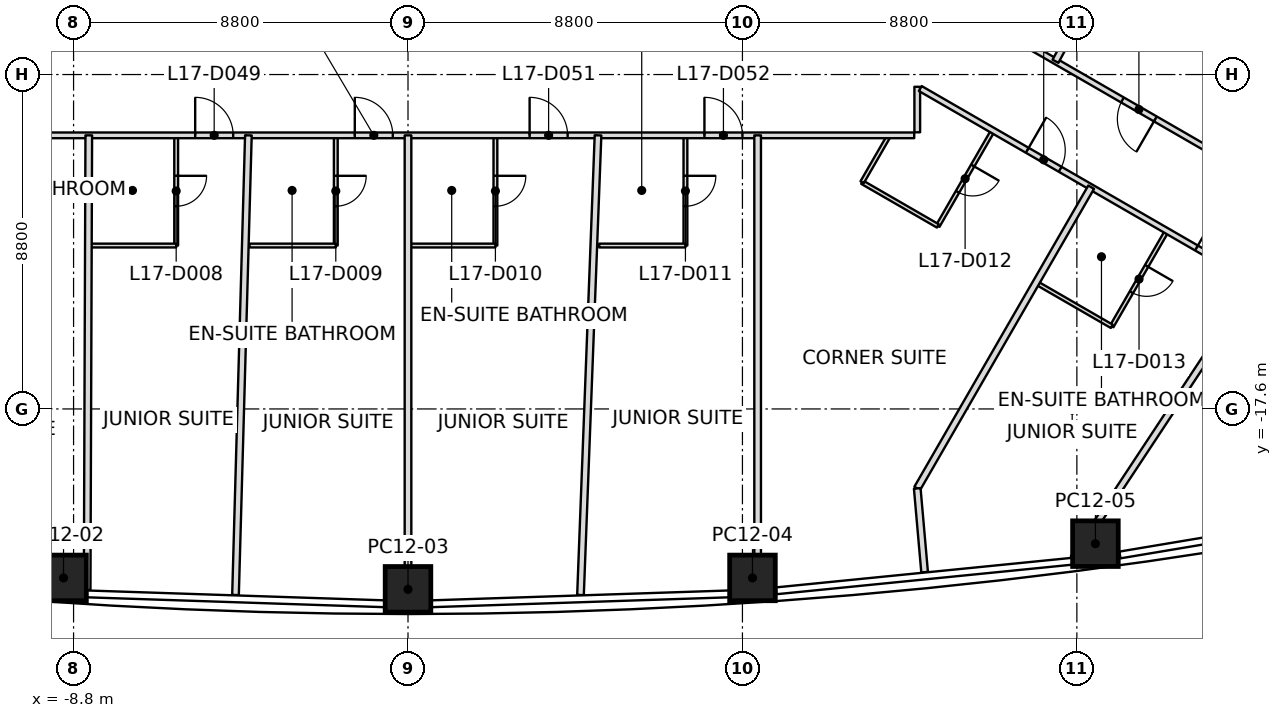
"""IFC4 building model, lengths in metres.
Left out: names, types, materials, properties, quantities, classifications, styles, units other than length and angle.
Written with IfcOpenShell. Run it as: python <this file> out.ifc"""

import sys

from ifc_helpers import new_model, si_unit, direction, frame, frame_2d, origin, origin_2d, place, context, subcontext, project, spatial, rectangle, extrude, element, fill, save


model = new_model("IFC4")
c1 = context("Model", 3, precision=1e-05, world=origin(), true_north=direction((0.0, 1.0)))
c2 = subcontext(c1, "Body", "Model", "MODEL_VIEW")
j1 = project(units=[si_unit("LENGTHUNIT", "METRE"), si_unit("PLANEANGLEUNIT", "RADIAN")], contexts=[c1])
p1 = place(None, origin())
s1 = spatial("IfcSite", under=j1, at=p1, CompositionType="ELEMENT")
p2 = place(p1, origin())
s2 = spatial("IfcBuilding", under=s1, at=p2, CompositionType="ELEMENT")
p3 = place(p2, frame((0.0, 0.0, 85.0)))
s3 = spatial("IfcBuildingStorey", under=s2, at=p3, CompositionType="ELEMENT", Elevation=85.0)
p4 = place(p3, frame((-9.064, -22.046, 0.0), z_axis=(0.00963262733, 0.012139749512, 0.999879912276), x_axis=(-0.99775239864, 0.06642749461, 0.008805621326)))
e1 = element("IfcColumn", 1, at=p4, inside=s3, PredefinedType="COLUMN", context=c2, shape_type="SweptSolid", body=[
    extrude(rectangle(XDim=1.2, YDim=1.2, at=origin_2d()), origin(), (0.0, 0.0, 1.0), 3.7),
])
p5 = place(p3, frame((0.0, -22.347, 0.0), z_axis=(0.0, 0.012338222751, 0.999923881233), x_axis=(1.0, 0.0, 0.0)))
e2 = element("IfcColumn", 2, at=p5, inside=s3, PredefinedType="COLUMN", context=c2, shape_type="SweptSolid", body=[
    extrude(rectangle(XDim=1.2, YDim=1.2, at=origin_2d()), origin(), (0.0, 0.0, 1.0), 3.7),
])
p6 = place(p3, frame((9.064, -22.046, 0.0), z_axis=(-0.00963262733, 0.012139749512, 0.999879912276), x_axis=(0.99775239864, 0.06642749461, 0.008805621326)))
e3 = element("IfcColumn", 3, at=p6, inside=s3, PredefinedType="COLUMN", context=c2, shape_type="SweptSolid", body=[
    extrude(rectangle(XDim=1.2, YDim=1.2, at=origin_2d()), origin(), (0.0, 0.0, 1.0), 3.7),
])
p7 = place(p3, frame((18.088, -21.145, 0.0), z_axis=(-0.019196808933, 0.011346567479, 0.99975133805), x_axis=(0.991022032909, 0.132545119301, 0.017524886246)))
e4 = element("IfcColumn", 4, at=p7, inside=s3, PredefinedType="COLUMN", context=c2, shape_type="SweptSolid", body=[
    extrude(rectangle(XDim=1.2, YDim=1.2, at=origin_2d()), origin(), (0.0, 0.0, 1.0), 3.701),
])
p8 = place(p3, frame((-8.4, -10.4, 0.0), z_axis=(0.0, 0.0, 1.0), x_axis=(-0.003610968563, -0.999993480432, 0.0)))
e5 = element("IfcWall", 5, at=p8, inside=s3, PredefinedType="PARTITIONING", context=c2, shape_type="SweptSolid", body=[
    extrude(rectangle(XDim=11.967, YDim=0.175, at=frame_2d((5.983, 0.0))), origin(), (0.0, 0.0, 1.0), 2.784),
])
p9 = place(p3, frame((-4.2, -10.4, 0.0), z_axis=(0.0, 0.0, 1.0), x_axis=(-0.028002254574, -0.999607859982, 0.0)))
e6 = element("IfcWall", 6, at=p9, inside=s3, PredefinedType="PARTITIONING", context=c2, shape_type="SweptSolid", body=[
    extrude(rectangle(XDim=12.101, YDim=0.175, at=frame_2d((6.051, 0.0))), origin(), (0.0, 0.0, 1.0), 2.784),
])
p10 = place(p3, frame((0.0, -10.4, 0.0), z_axis=(0.0, 0.0, 1.0), x_axis=(0.0, -1.0, 0.0)))
e7 = element("IfcWall", 7, at=p10, inside=s3, PredefinedType="PARTITIONING", context=c2, shape_type="SweptSolid", body=[
    extrude(rectangle(XDim=12.477, YDim=0.175, at=frame_2d((6.239, 0.0))), origin(), (0.0, 0.0, 1.0), 3.0),
])
p11 = place(p3, frame((5.0, -10.4, 0.0), z_axis=(0.0, 0.0, 1.0), x_axis=(-0.038096970103, -0.999274046931, 0.0)))
e8 = element("IfcWall", 8, at=p11, inside=s3, PredefinedType="PARTITIONING", context=c2, shape_type="SweptSolid", body=[
    extrude(rectangle(XDim=12.105, YDim=0.175, at=frame_2d((6.053, 0.0))), origin(), (0.0, 0.0, 1.0), 2.784),
])
p12 = place(p3, frame((9.2, -10.4, 0.0), z_axis=(0.0, 0.0, 1.0), x_axis=(0.0, -1.0, 0.0)))
e9 = element("IfcWall", 9, at=p12, inside=s3, PredefinedType="PARTITIONING", context=c2, shape_type="SweptSolid", body=[
    extrude(rectangle(XDim=12.166, YDim=0.175, at=frame_2d((6.083, 0.0))), origin(), (0.0, 0.0, 1.0), 3.0),
])
p13 = place(p3, frame((17.976, -11.764, 0.0), z_axis=(0.0, 0.0, 1.0), x_axis=(-0.500014927562, -0.866016785181, 0.0)))
e10 = element("IfcWall", 10, at=p13, inside=s3, PredefinedType="PARTITIONING", context=c2, shape_type="SweptSolid", body=[
    extrude(rectangle(XDim=9.153, YDim=0.175, at=frame_2d((4.576, 0.0))), origin(), (0.0, 0.0, 1.0), 2.943),
])
p14 = place(p3, frame((13.4, -19.691, 0.0), z_axis=(0.0, 0.0, 1.0), x_axis=(0.087462475332, -0.996167814883, 0.0)))
e11 = element("IfcWall", 11, at=p14, inside=s3, PredefinedType="PARTITIONING", context=c2, shape_type="SweptSolid", body=[
    extrude(rectangle(XDim=2.214, YDim=0.175, at=frame_2d((1.107, 0.0))), origin(), (0.0, 0.0, 1.0), 2.784),
])
p15 = place(p3, frame((23.629, 3.835, 0.0), z_axis=(0.0, 0.0, 1.0), x_axis=(-0.472762655376, -0.881189804572, 0.0)))
e12 = element("IfcWall", 12, at=p15, inside=s3, PredefinedType="PARTITIONING", context=c2, shape_type="SweptSolid", body=[
    extrude(rectangle(XDim=13.942, YDim=0.175, at=frame_2d((6.971, 0.0))), origin(), (0.0, 0.0, 1.0), 2.947),
])
p16 = place(p3, frame((22.306, -14.264, 0.0), z_axis=(0.0, 0.0, 1.0), x_axis=(-0.5509763379, -0.834520865571, 0.0)))
e13 = element("IfcWall", 13, at=p16, inside=s3, PredefinedType="PARTITIONING", context=c2, shape_type="SweptSolid", body=[
    extrude(rectangle(XDim=8.697, YDim=0.175, at=frame_2d((4.349, 0.0))), origin(), (0.0, 0.0, 1.0), 3.0),
])
p17 = place(p3, frame((-13.32, -10.4, 0.0), z_axis=(0.0, 0.0, 1.0), x_axis=(1.0, 0.0, 0.0)))
e14 = element("IfcWall", 14, at=p17, inside=s3, PredefinedType="PARTITIONING", context=c2, shape_type="SweptSolid", body=[
    extrude(rectangle(XDim=26.64, YDim=0.15, at=frame_2d((13.32, 0.0))), origin(), (0.0, 0.0, 1.0), 2.797),
])
p18 = place(p17, frame((7.72, 0.0, 0.0)))
e15 = element("IfcOpeningElement", 15, at=p18, cuts=e14, PredefinedType="OPENING", context=c2, shape_type="SweptSolid", body=[
    extrude(rectangle(XDim=1.0, YDim=2.1, at=frame_2d((0.5, 1.05))), frame((0.0, 0.075, 0.0), z_axis=(0.0, -1.0, 0.0), x_axis=(1.0, 0.0, 0.0)), (0.0, 0.0, 1.0), 0.15),
])
p19 = place(p17, frame((11.92, 0.0, 0.0)))
e16 = element("IfcOpeningElement", 16, at=p19, cuts=e14, PredefinedType="OPENING", context=c2, shape_type="SweptSolid", body=[
    extrude(rectangle(XDim=1.0, YDim=2.1, at=frame_2d((0.5, 1.05))), frame((0.0, 0.075, 0.0), z_axis=(0.0, -1.0, 0.0), x_axis=(1.0, 0.0, 0.0)), (0.0, 0.0, 1.0), 0.15),
])
p20 = place(p17, frame((16.52, 0.0, 0.0)))
e17 = element("IfcOpeningElement", 17, at=p20, cuts=e14, PredefinedType="OPENING", context=c2, shape_type="SweptSolid", body=[
    extrude(rectangle(XDim=1.0, YDim=2.1, at=frame_2d((0.5, 1.05))), frame((0.0, 0.075, 0.0), z_axis=(0.0, -1.0, 0.0), x_axis=(1.0, 0.0, 0.0)), (0.0, 0.0, 1.0), 0.15),
])
p21 = place(p17, frame((21.12, 0.0, 0.0)))
e18 = element("IfcOpeningElement", 18, at=p21, cuts=e14, PredefinedType="OPENING", context=c2, shape_type="SweptSolid", body=[
    extrude(rectangle(XDim=1.0, YDim=2.1, at=frame_2d((0.5, 1.05))), frame((0.0, 0.075, 0.0), z_axis=(0.0, -1.0, 0.0), x_axis=(1.0, 0.0, 0.0)), (0.0, 0.0, 1.0), 0.15),
])
p22 = place(p3, frame((13.4, -10.32, 0.0), z_axis=(0.0, 0.0, 1.0), x_axis=(0.0, 1.0, 0.0)))
e19 = element("IfcWall", 19, at=p22, inside=s3, PredefinedType="PARTITIONING", context=c2, shape_type="SweptSolid", body=[
    extrude(rectangle(XDim=1.198, YDim=0.15, at=frame_2d((0.599, 0.0))), origin(), (0.0, 0.0, 1.0), 2.797),
])
p23 = place(p3, frame((13.479, -9.168, 0.0), z_axis=(0.0, 0.0, 1.0), x_axis=(0.866022360211, -0.500005271586, 0.0)))
e20 = element("IfcWall", 20, at=p23, inside=s3, PredefinedType="PARTITIONING", context=c2, shape_type="SweptSolid", body=[
    extrude(rectangle(XDim=10.113, YDim=0.15, at=frame_2d((5.056, 0.0))), origin(), (0.0, 0.0, 1.0), 2.797),
])
p24 = place(p23, frame((3.25, 0.0, 0.0)))
e21 = element("IfcOpeningElement", 21, at=p24, cuts=e20, PredefinedType="OPENING", context=c2, shape_type="SweptSolid", body=[
    extrude(rectangle(XDim=1.0, YDim=2.1, at=frame_2d((0.5, 1.05))), frame((0.0, 0.075, 0.0), z_axis=(0.0, -1.0, 0.0), x_axis=(1.0, 0.0, 0.0)), (0.0, 0.0, 1.0), 0.15),
])
p25 = place(p23, frame((8.393, 0.0, 0.0)))
e22 = element("IfcOpeningElement", 22, at=p25, cuts=e20, PredefinedType="OPENING", context=c2, shape_type="SweptSolid", body=[
    extrude(rectangle(XDim=1.0, YDim=2.1, at=frame_2d((0.5, 1.05))), frame((0.0, 0.075, 0.0), z_axis=(0.0, -1.0, 0.0), x_axis=(1.0, 0.0, 0.0)), (0.0, 0.0, 1.0), 0.15),
])
p26 = place(p3, frame((23.437, -12.146, 0.0), z_axis=(0.0, 0.0, 1.0), x_axis=(-0.866025625133, 0.499999616612, 0.0)))
e23 = element("IfcWall", 23, at=p26, inside=s3, PredefinedType="PARTITIONING", context=c2, shape_type="SweptSolid", body=[
    extrude(rectangle(XDim=11.59, YDim=0.15, at=frame_2d((5.795, 0.0))), origin(), (0.0, 0.0, 1.0), 2.947),
])
p27 = place(p26, frame((4.355, 0.0, 0.0)))
e24 = element("IfcOpeningElement", 24, at=p27, cuts=e23, PredefinedType="OPENING", context=c2, shape_type="SweptSolid", body=[
    extrude(rectangle(XDim=1.0, YDim=2.1, at=frame_2d((0.5, 1.05))), frame((0.0, 0.075, 0.0), z_axis=(0.0, -1.0, 0.0), x_axis=(1.0, 0.0, 0.0)), (0.0, 0.0, 1.0), 0.15),
])
p28 = place(p3, frame((-6.1, -10.43, 0.0), z_axis=(0.0, 0.0, 1.0), x_axis=(0.0, -1.0, 0.0)))
e25 = element("IfcWall", 25, at=p28, inside=s3, PredefinedType="PARTITIONING", context=c2, shape_type="SweptSolid", body=[
    extrude(rectangle(XDim=2.87, YDim=0.1, at=frame_2d((1.435, 0.0))), origin(), (0.0, 0.0, 1.0), 3.0),
])
p29 = place(p28, frame((1.035, 0.0, 0.0)))
e26 = element("IfcOpeningElement", 26, at=p29, cuts=e25, PredefinedType="OPENING", context=c2, shape_type="SweptSolid", body=[
    extrude(rectangle(XDim=0.8, YDim=2.1, at=frame_2d((0.4, 1.05))), frame((0.0, 0.05, 0.0), z_axis=(0.0, -1.0, 0.0), x_axis=(1.0, 0.0, 0.0)), (0.0, 0.0, 1.0), 0.1),
])
p30 = place(p3, frame((-6.1, -13.3, 0.0), z_axis=(0.0, 0.0, 1.0), x_axis=(-1.0, 0.0, 0.0)))
e27 = element("IfcWall", 27, at=p30, inside=s3, PredefinedType="PARTITIONING", context=c2, shape_type="SweptSolid", body=[
    extrude(rectangle(XDim=2.27, YDim=0.1, at=frame_2d((1.135, 0.0))), origin(), (0.0, 0.0, 1.0), 3.0),
])
p31 = place(p3, frame((-1.9, -10.43, 0.0), z_axis=(0.0, 0.0, 1.0), x_axis=(0.0, -1.0, 0.0)))
e28 = element("IfcWall", 28, at=p31, inside=s3, PredefinedType="PARTITIONING", context=c2, shape_type="SweptSolid", body=[
    extrude(rectangle(XDim=2.87, YDim=0.1, at=frame_2d((1.435, 0.0))), origin(), (0.0, 0.0, 1.0), 3.0),
])
p32 = place(p31, frame((1.035, 0.0, 0.0)))
e29 = element("IfcOpeningElement", 29, at=p32, cuts=e28, PredefinedType="OPENING", context=c2, shape_type="SweptSolid", body=[
    extrude(rectangle(XDim=0.8, YDim=2.1, at=frame_2d((0.4, 1.05))), frame((0.0, 0.05, 0.0), z_axis=(0.0, -1.0, 0.0), x_axis=(1.0, 0.0, 0.0)), (0.0, 0.0, 1.0), 0.1),
])
p33 = place(p3, frame((-1.9, -13.3, 0.0), z_axis=(0.0, 0.0, 1.0), x_axis=(-1.0, 0.0, 0.0)))
e30 = element("IfcWall", 30, at=p33, inside=s3, PredefinedType="PARTITIONING", context=c2, shape_type="SweptSolid", body=[
    extrude(rectangle(XDim=2.27, YDim=0.1, at=frame_2d((1.135, 0.0))), origin(), (0.0, 0.0, 1.0), 3.0),
])
p34 = place(p3, frame((2.3, -10.43, 0.0), z_axis=(0.0, 0.0, 1.0), x_axis=(0.0, -1.0, 0.0)))
e31 = element("IfcWall", 31, at=p34, inside=s3, PredefinedType="PARTITIONING", context=c2, shape_type="SweptSolid", body=[
    extrude(rectangle(XDim=2.87, YDim=0.1, at=frame_2d((1.435, 0.0))), origin(), (0.0, 0.0, 1.0), 3.0),
])
p35 = place(p34, frame((1.035, 0.0, 0.0)))
e32 = element("IfcOpeningElement", 32, at=p35, cuts=e31, PredefinedType="OPENING", context=c2, shape_type="SweptSolid", body=[
    extrude(rectangle(XDim=0.8, YDim=2.1, at=frame_2d((0.4, 1.05))), frame((0.0, 0.05, 0.0), z_axis=(0.0, -1.0, 0.0), x_axis=(1.0, 0.0, 0.0)), (0.0, 0.0, 1.0), 0.1),
])
p36 = place(p3, frame((2.3, -13.3, 0.0), z_axis=(0.0, 0.0, 1.0), x_axis=(-1.0, 0.0, 0.0)))
e33 = element("IfcWall", 33, at=p36, inside=s3, PredefinedType="PARTITIONING", context=c2, shape_type="SweptSolid", body=[
    extrude(rectangle(XDim=2.27, YDim=0.1, at=frame_2d((1.135, 0.0))), origin(), (0.0, 0.0, 1.0), 2.797),
])
p37 = place(p3, frame((7.3, -10.43, 0.0), z_axis=(0.0, 0.0, 1.0), x_axis=(0.0, -1.0, 0.0)))
e34 = element("IfcWall", 34, at=p37, inside=s3, PredefinedType="PARTITIONING", context=c2, shape_type="SweptSolid", body=[
    extrude(rectangle(XDim=2.87, YDim=0.1, at=frame_2d((1.435, 0.0))), origin(), (0.0, 0.0, 1.0), 3.0),
])
p38 = place(p37, frame((1.035, 0.0, 0.0)))
e35 = element("IfcOpeningElement", 35, at=p38, cuts=e34, PredefinedType="OPENING", context=c2, shape_type="SweptSolid", body=[
    extrude(rectangle(XDim=0.8, YDim=2.1, at=frame_2d((0.4, 1.05))), frame((0.0, 0.05, 0.0), z_axis=(0.0, -1.0, 0.0), x_axis=(1.0, 0.0, 0.0)), (0.0, 0.0, 1.0), 0.1),
])
p39 = place(p3, frame((7.3, -13.3, 0.0), z_axis=(0.0, 0.0, 1.0), x_axis=(-1.0, 0.0, 0.0)))
e36 = element("IfcWall", 36, at=p39, inside=s3, PredefinedType="PARTITIONING", context=c2, shape_type="SweptSolid", body=[
    extrude(rectangle(XDim=2.27, YDim=0.1, at=frame_2d((1.135, 0.0))), origin(), (0.0, 0.0, 1.0), 3.0),
])
p40 = place(p3, frame((15.377, -10.298, 0.0), z_axis=(0.0, 0.0, 1.0), x_axis=(-0.499999802827, -0.866025517622, 0.0)))
e37 = element("IfcWall", 37, at=p40, inside=s3, PredefinedType="PARTITIONING", context=c2, shape_type="SweptSolid", body=[
    extrude(rectangle(XDim=2.87, YDim=0.1, at=frame_2d((1.435, 0.0))), origin(), (0.0, 0.0, 1.0), 2.797),
])
p41 = place(p40, frame((1.035, 0.0, 0.0)))
e38 = element("IfcOpeningElement", 38, at=p41, cuts=e37, PredefinedType="OPENING", context=c2, shape_type="SweptSolid", body=[
    extrude(rectangle(XDim=0.8, YDim=2.1, at=frame_2d((0.4, 1.05))), frame((0.0, 0.05, 0.0), z_axis=(0.0, -1.0, 0.0), x_axis=(1.0, 0.0, 0.0)), (0.0, 0.0, 1.0), 0.1),
])
p42 = place(p3, frame((13.942, -12.784, 0.0), z_axis=(0.0, 0.0, 1.0), x_axis=(-0.866007057882, 0.500031774688, 0.0)))
e39 = element("IfcWall", 39, at=p42, inside=s3, PredefinedType="PARTITIONING", context=c2, shape_type="SweptSolid", body=[
    extrude(rectangle(XDim=2.3, YDim=0.1, at=frame_2d((1.15, 0.0))), origin(), (0.0, 0.0, 1.0), 3.0),
])
p43 = place(p3, frame((11.95, -11.634, 0.0), z_axis=(0.0, 0.0, 1.0), x_axis=(0.500087364259, 0.86597495813, 0.0)))
e40 = element("IfcWall", 40, at=p43, inside=s3, PredefinedType="PARTITIONING", context=c2, shape_type="SweptSolid", body=[
    extrude(rectangle(XDim=1.39, YDim=0.1, at=frame_2d((0.695, 0.0))), origin(), (0.0, 0.0, 1.0), 3.0),
])
p44 = place(p3, frame((19.953, -12.94, 0.0), z_axis=(0.0, 0.0, 1.0), x_axis=(-0.499936001555, -0.866062350151, 0.0)))
e41 = element("IfcWall", 41, at=p44, inside=s3, PredefinedType="PARTITIONING", context=c2, shape_type="SweptSolid", body=[
    extrude(rectangle(XDim=2.87, YDim=0.1, at=frame_2d((1.435, 0.0))), origin(), (0.0, 0.0, 1.0), 3.0),
])
p45 = place(p44, frame((1.035, 0.0, 0.0)))
e42 = element("IfcOpeningElement", 42, at=p45, cuts=e41, PredefinedType="OPENING", context=c2, shape_type="SweptSolid", body=[
    extrude(rectangle(XDim=0.8, YDim=2.1, at=frame_2d((0.4, 1.05))), frame((0.0, 0.05, 0.0), z_axis=(0.0, -1.0, 0.0), x_axis=(1.0, 0.0, 0.0)), (0.0, 0.0, 1.0), 0.1),
])
p46 = place(p3, frame((18.518, -15.426, 0.0), z_axis=(0.0, 0.0, 1.0), x_axis=(-0.866044110172, 0.499967598186, 0.0)))
e43 = element("IfcWall", 43, at=p46, inside=s3, PredefinedType="PARTITIONING", context=c2, shape_type="SweptSolid", body=[
    extrude(rectangle(XDim=2.27, YDim=0.1, at=frame_2d((1.135, 0.0))), origin(), (0.0, 0.0, 1.0), 3.0),
])
p47 = place(p18, origin())
e44 = element("IfcDoor", 44, at=p47, inside=s3, OperationType="SINGLE_SWING_LEFT", PredefinedType="DOOR", context=c2, shape_type="SweptSolid", body=[
    extrude(rectangle(XDim=1.0, YDim=2.1, at=frame_2d((0.5, 1.05))), frame((0.0, 0.025, 0.0), z_axis=(0.0, -1.0, 0.0), x_axis=(1.0, 0.0, 0.0)), (0.0, 0.0, 1.0), 0.05),
])
fill(e15, e44)
p48 = place(p29, origin())
e45 = element("IfcDoor", 45, at=p48, inside=s3, OperationType="SINGLE_SWING_RIGHT", PredefinedType="DOOR", context=c2, shape_type="SweptSolid", body=[
    extrude(rectangle(XDim=0.8, YDim=2.1, at=frame_2d((0.4, 1.05))), frame((0.0, 0.025, 0.0), z_axis=(0.0, -1.0, 0.0), x_axis=(1.0, 0.0, 0.0)), (0.0, 0.0, 1.0), 0.05),
])
fill(e26, e45)
p49 = place(p19, origin())
e46 = element("IfcDoor", 46, at=p49, inside=s3, OperationType="SINGLE_SWING_LEFT", PredefinedType="DOOR", context=c2, shape_type="SweptSolid", body=[
    extrude(rectangle(XDim=1.0, YDim=2.1, at=frame_2d((0.5, 1.05))), frame((0.0, 0.025, 0.0), z_axis=(0.0, -1.0, 0.0), x_axis=(1.0, 0.0, 0.0)), (0.0, 0.0, 1.0), 0.05),
])
fill(e16, e46)
p50 = place(p32, origin())
e47 = element("IfcDoor", 47, at=p50, inside=s3, OperationType="SINGLE_SWING_LEFT", PredefinedType="DOOR", context=c2, shape_type="SweptSolid", body=[
    extrude(rectangle(XDim=0.8, YDim=2.1, at=frame_2d((0.4, 1.05))), frame((0.0, 0.025, 0.0), z_axis=(0.0, -1.0, 0.0), x_axis=(1.0, 0.0, 0.0)), (0.0, 0.0, 1.0), 0.05),
])
fill(e29, e47)
p51 = place(p20, origin())
e48 = element("IfcDoor", 48, at=p51, inside=s3, OperationType="SINGLE_SWING_LEFT", PredefinedType="DOOR", context=c2, shape_type="SweptSolid", body=[
    extrude(rectangle(XDim=1.0, YDim=2.1, at=frame_2d((0.5, 1.05))), frame((0.0, 0.025, 0.0), z_axis=(0.0, -1.0, 0.0), x_axis=(1.0, 0.0, 0.0)), (0.0, 0.0, 1.0), 0.05),
])
fill(e17, e48)
p52 = place(p35, origin())
e49 = element("IfcDoor", 49, at=p52, inside=s3, OperationType="SINGLE_SWING_RIGHT", PredefinedType="DOOR", context=c2, shape_type="SweptSolid", body=[
    extrude(rectangle(XDim=0.8, YDim=2.1, at=frame_2d((0.4, 1.05))), frame((0.0, 0.025, 0.0), z_axis=(0.0, -1.0, 0.0), x_axis=(1.0, 0.0, 0.0)), (0.0, 0.0, 1.0), 0.05),
])
fill(e32, e49)
p53 = place(p21, origin())
e50 = element("IfcDoor", 50, at=p53, inside=s3, OperationType="SINGLE_SWING_LEFT", PredefinedType="DOOR", context=c2, shape_type="SweptSolid", body=[
    extrude(rectangle(XDim=1.0, YDim=2.1, at=frame_2d((0.5, 1.05))), frame((0.0, 0.025, 0.0), z_axis=(0.0, -1.0, 0.0), x_axis=(1.0, 0.0, 0.0)), (0.0, 0.0, 1.0), 0.05),
])
fill(e18, e50)
p54 = place(p38, origin())
e51 = element("IfcDoor", 51, at=p54, inside=s3, OperationType="SINGLE_SWING_RIGHT", PredefinedType="DOOR", context=c2, shape_type="SweptSolid", body=[
    extrude(rectangle(XDim=0.8, YDim=2.1, at=frame_2d((0.4, 1.05))), frame((0.0, 0.025, 0.0), z_axis=(0.0, -1.0, 0.0), x_axis=(1.0, 0.0, 0.0)), (0.0, 0.0, 1.0), 0.05),
])
fill(e35, e51)
p55 = place(p24, origin())
e52 = element("IfcDoor", 52, at=p55, inside=s3, OperationType="SINGLE_SWING_LEFT", PredefinedType="DOOR", context=c2, shape_type="SweptSolid", body=[
    extrude(rectangle(XDim=1.0, YDim=2.1, at=frame_2d((0.5, 1.05))), frame((0.0, 0.025, 0.0), z_axis=(0.0, -1.0, 0.0), x_axis=(1.0, 0.0, 0.0)), (0.0, 0.0, 1.0), 0.05),
])
fill(e21, e52)
p56 = place(p41, origin())
e53 = element("IfcDoor", 53, at=p56, inside=s3, OperationType="SINGLE_SWING_RIGHT", PredefinedType="DOOR", context=c2, shape_type="SweptSolid", body=[
    extrude(rectangle(XDim=0.8, YDim=2.1, at=frame_2d((0.4, 1.05))), frame((0.0, 0.025, 0.0), z_axis=(0.0, -1.0, 0.0), x_axis=(1.0, 0.0, 0.0)), (0.0, 0.0, 1.0), 0.05),
])
fill(e38, e53)
p57 = place(p25, origin())
e54 = element("IfcDoor", 54, at=p57, inside=s3, OperationType="SINGLE_SWING_LEFT", PredefinedType="DOOR", context=c2, shape_type="SweptSolid", body=[
    extrude(rectangle(XDim=1.0, YDim=2.1, at=frame_2d((0.5, 1.05))), frame((0.0, 0.025, 0.0), z_axis=(0.0, -1.0, 0.0), x_axis=(1.0, 0.0, 0.0)), (0.0, 0.0, 1.0), 0.05),
])
fill(e22, e54)
p58 = place(p45, origin())
e55 = element("IfcDoor", 55, at=p58, inside=s3, OperationType="SINGLE_SWING_RIGHT", PredefinedType="DOOR", context=c2, shape_type="SweptSolid", body=[
    extrude(rectangle(XDim=0.8, YDim=2.1, at=frame_2d((0.4, 1.05))), frame((0.0, 0.025, 0.0), z_axis=(0.0, -1.0, 0.0), x_axis=(1.0, 0.0, 0.0)), (0.0, 0.0, 1.0), 0.05),
])
fill(e42, e55)
p59 = place(p27, origin())
e56 = element("IfcDoor", 56, at=p59, inside=s3, OperationType="SINGLE_SWING_LEFT", PredefinedType="DOOR", context=c2, shape_type="SweptSolid", body=[
    extrude(rectangle(XDim=1.0, YDim=2.1, at=frame_2d((0.5, 1.05))), frame((0.0, 0.025, 0.0), z_axis=(0.0, -1.0, 0.0), x_axis=(1.0, 0.0, 0.0)), (0.0, 0.0, 1.0), 0.05),
])
fill(e24, e56)
save(model, sys.argv[1])
